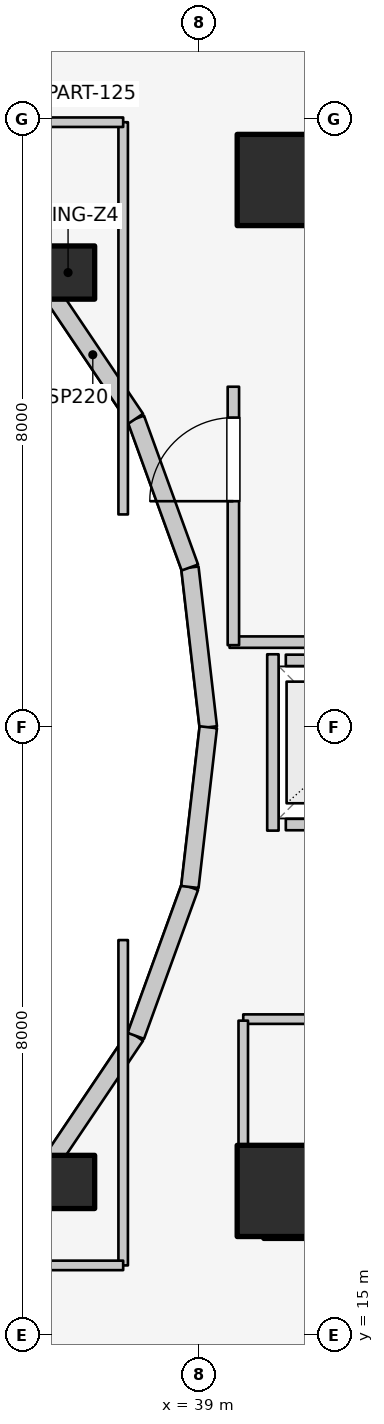
"""IFC4 building model, lengths in metres.
Left out: names, types, materials, properties, quantities, classifications, styles, units other than length and angle.
Written with IfcOpenShell. Run it as: python <this file> out.ifc"""

import sys

from ifc_helpers import new_model, si_unit, direction, frame, frame_2d, origin, origin_2d, place, context, subcontext, project, spatial, rectangle, extrude, element, fill, save


model = new_model("IFC4")
c1 = context("Model", 3, precision=1e-05, world=origin(), true_north=direction((0.0, 1.0)))
c2 = subcontext(c1, "Body", "Model", "MODEL_VIEW")
j1 = project(units=[si_unit("LENGTHUNIT", "METRE"), si_unit("PLANEANGLEUNIT", "RADIAN")], contexts=[c1])
p1 = place(None, origin())
s1 = spatial("IfcSite", under=j1, at=p1, CompositionType="ELEMENT")
p2 = place(p1, origin())
s2 = spatial("IfcBuilding", under=s1, at=p2, CompositionType="ELEMENT")
p3 = place(p2, frame((0.0, 0.0, 207.8)))
s3 = spatial("IfcBuildingStorey", under=s2, at=p3, CompositionType="ELEMENT", Elevation=207.8)
for number, where, z_axis, x_axis in (
    (1, (39.85, 16.55, 0.0), (0.0, 0.0, 1.0), (1.0, 0.0, 0.0)),
    (2, (39.85, 30.35, 0.0), (0.0, 0.0, 1.0), (1.0, 0.0, 0.0)),
):
    element("IfcWall", number, at=place(p3, frame(where, z_axis=z_axis, x_axis=x_axis)), inside=s3, PredefinedType="SHEAR", context=c2, shape_type="SweptSolid", body=[
        extrude(rectangle(XDim=4.5, YDim=0.55, at=frame_2d((2.25, 0.0))), origin(), (0.0, 0.0, 1.0), 3.1),
    ])
for number, where, z_axis, x_axis in (
    (3, (40.1, 16.9, 0.0), (0.0, 0.0, 1.0), (1.0, 0.0, 0.0)),
    (4, (40.1, 30.2, 0.0), (0.0, 0.0, 1.0), (1.0, 0.0, 0.0)),
):
    element("IfcColumn", number, at=place(p3, frame(where, z_axis=z_axis, x_axis=x_axis)), inside=s3, PredefinedType="COLUMN", context=c2, shape_type="SweptSolid", body=[
        extrude(rectangle(XDim=1.2, YDim=1.2, at=origin_2d()), origin(), (0.0, 0.0, 1.0), 3.1),
    ])
for number, where, z_axis, x_axis in (
    (5, (37.275, 28.982, 0.0), (0.0, 0.0, 1.0), (1.0, 0.0, 0.0)),
    (6, (37.275, 17.018, 0.0), (0.0, 0.0, 1.0), (1.0, 0.0, 0.0)),
):
    element("IfcColumn", number, at=place(p3, frame(where, z_axis=z_axis, x_axis=x_axis)), inside=s3, PredefinedType="COLUMN", context=c2, shape_type="SweptSolid", body=[
        extrude(rectangle(XDim=0.7, YDim=0.7, at=origin_2d()), origin(), (0.0, 0.0, 1.0), 3.1),
    ])
p4 = place(p3, frame((39.12, 23.0, 0.0), z_axis=(0.0, 0.0, 1.0), x_axis=(-0.114711713601, 0.993398823617, 0.0)))
e7 = element("IfcWall", 7, at=p4, inside=s3, PredefinedType="STANDARD", context=c2, shape_type="SweptSolid", body=[
    extrude(rectangle(XDim=2.115, YDim=0.23, at=frame_2d((1.058, 0.0))), origin(), (0.0, 0.0, 1.0), 2.56),
])
p5 = place(p3, frame((38.877, 25.102, 0.0), z_axis=(0.0, 0.0, 1.0), x_axis=(-0.341423187295, 0.93990968033, 0.0)))
e8 = element("IfcWall", 8, at=p5, inside=s3, PredefinedType="STANDARD", context=c2, shape_type="SweptSolid", body=[
    extrude(rectangle(XDim=2.084, YDim=0.23, at=frame_2d((1.042, 0.0))), origin(), (0.0, 0.0, 1.0), 2.56),
])
p6 = place(p3, frame((38.166, 27.06, 0.0), z_axis=(0.0, 0.0, 1.0), x_axis=(-0.558197800898, 0.829707909492, 0.0)))
e9 = element("IfcWall", 9, at=p6, inside=s3, PredefinedType="STANDARD", context=c2, shape_type="SweptSolid", body=[
    extrude(rectangle(XDim=2.027, YDim=0.23, at=frame_2d((1.013, 0.0))), origin(), (0.0, 0.0, 1.0), 1.22),
])
for number, where, z_axis, x_axis in (
    (10, (37.035, 28.742, 0.0), (0.0, 0.0, 1.0), (-0.753, 0.659, 0.0)),
    (11, (35.56, 15.968, 0.0), (0.0, 0.0, 1.0), (0.753, 0.659, 0.0)),
):
    element("IfcWall", number, at=place(p3, frame(where, z_axis=z_axis, x_axis=x_axis)), inside=s3, PredefinedType="STANDARD", context=c2, shape_type="SweptSolid", body=[
        extrude(rectangle(XDim=1.959, YDim=0.23, at=frame_2d((0.98, 0.0))), origin(), (0.0, 0.0, 1.0), 1.22),
    ])
p7 = place(p3, frame((37.035, 17.258, 0.0), z_axis=(0.0, 0.0, 1.0), x_axis=(0.558197800898, 0.829707909492, 0.0)))
e12 = element("IfcWall", 12, at=p7, inside=s3, PredefinedType="STANDARD", context=c2, shape_type="SweptSolid", body=[
    extrude(rectangle(XDim=2.027, YDim=0.23, at=frame_2d((1.013, 0.0))), origin(), (0.0, 0.0, 1.0), 1.22),
])
p8 = place(p3, frame((38.166, 18.94, 0.0), z_axis=(0.0, 0.0, 1.0), x_axis=(0.341423187295, 0.93990968033, 0.0)))
e13 = element("IfcWall", 13, at=p8, inside=s3, PredefinedType="STANDARD", context=c2, shape_type="SweptSolid", body=[
    extrude(rectangle(XDim=2.084, YDim=0.23, at=frame_2d((1.042, 0.0))), origin(), (0.0, 0.0, 1.0), 2.56),
])
p9 = place(p3, frame((38.877, 20.898, 0.0), z_axis=(0.0, 0.0, 1.0), x_axis=(0.114711713601, 0.993398823617, 0.0)))
e14 = element("IfcWall", 14, at=p9, inside=s3, PredefinedType="STANDARD", context=c2, shape_type="SweptSolid", body=[
    extrude(rectangle(XDim=2.115, YDim=0.23, at=frame_2d((1.058, 0.0))), origin(), (0.0, 0.0, 1.0), 2.56),
])
p10 = place(p3, frame((40.14, 21.72, 0.0), z_axis=(0.0, 0.0, 1.0), x_axis=(1.0, 0.0, 0.0)))
e15 = element("IfcWall", 15, at=p10, inside=s3, PredefinedType="SOLIDWALL", context=c2, shape_type="SweptSolid", body=[
    extrude(rectangle(XDim=1.82, YDim=0.15, at=frame_2d((0.91, 0.0))), origin(), (0.0, 0.0, 1.0), 2.12),
])
p11 = place(p10, frame((0.36, 0.0, 0.0)))
e16 = element("IfcOpeningElement", 16, at=p11, cuts=e15, PredefinedType="OPENING", context=c2, shape_type="SweptSolid", body=[
    extrude(rectangle(XDim=1.1, YDim=2.1, at=frame_2d((0.55, 1.05))), frame((0.0, 0.085, 0.0), z_axis=(0.0, -1.0, 0.0), x_axis=(1.0, 0.0, 0.0)), (0.0, 0.0, 1.0), 0.17),
])
p12 = place(p3, frame((40.14, 23.88, 0.0), z_axis=(0.0, 0.0, 1.0), x_axis=(1.0, 0.0, 0.0)))
e17 = element("IfcWall", 17, at=p12, inside=s3, PredefinedType="SOLIDWALL", context=c2, shape_type="SweptSolid", body=[
    extrude(rectangle(XDim=1.82, YDim=0.15, at=frame_2d((0.91, 0.0))), origin(), (0.0, 0.0, 1.0), 2.12),
])
p13 = place(p3, frame((39.97, 21.64, 0.0), z_axis=(0.0, 0.0, 1.0), x_axis=(0.0, 1.0, 0.0)))
e18 = element("IfcWall", 18, at=p13, inside=s3, PredefinedType="SOLIDWALL", context=c2, shape_type="SweptSolid", body=[
    extrude(rectangle(XDim=2.32, YDim=0.15, at=frame_2d((1.16, 0.0))), origin(), (0.0, 0.0, 1.0), 2.12),
])
p14 = place(p3, frame((39.4, 24.12, 0.0), z_axis=(0.0, 0.0, 1.0), x_axis=(1.0, 0.0, 0.0)))
e19 = element("IfcWall", 19, at=p14, inside=s3, PredefinedType="PARTITIONING", context=c2, shape_type="SweptSolid", body=[
    extrude(rectangle(XDim=5.08, YDim=0.15, at=frame_2d((2.54, 0.0))), origin(), (0.0, 0.0, 1.0), 2.12),
])
p15 = place(p3, frame((39.45, 24.08, 0.0), z_axis=(0.0, 0.0, 1.0), x_axis=(0.0, 1.0, 0.0)))
e20 = element("IfcWall", 20, at=p15, inside=s3, PredefinedType="PARTITIONING", context=c2, shape_type="SweptSolid", body=[
    extrude(rectangle(XDim=3.4, YDim=0.15, at=frame_2d((1.7, 0.0))), origin(), (0.0, 0.0, 1.0), 2.575),
])
p16 = place(p15, frame((1.894, 0.0, 0.0)))
e21 = element("IfcOpeningElement", 21, at=p16, cuts=e20, PredefinedType="OPENING", context=c2, shape_type="SweptSolid", body=[
    extrude(rectangle(XDim=1.1, YDim=2.1, at=frame_2d((0.55, 1.05))), frame((0.0, 0.085, 0.0), z_axis=(0.0, -1.0, 0.0), x_axis=(1.0, 0.0, 0.0)), (0.0, 0.0, 1.0), 0.17),
])
p17 = place(p3, frame((39.58, 19.16, 0.0), z_axis=(0.0, 0.0, 1.0), x_axis=(1.0, 0.0, 0.0)))
e22 = element("IfcWall", 22, at=p17, inside=s3, PredefinedType="PARTITIONING", context=c2, shape_type="SweptSolid", body=[
    extrude(rectangle(XDim=4.87, YDim=0.125, at=frame_2d((2.435, 0.0))), origin(), (0.0, 0.0, 1.0), 2.12),
])
p18 = place(p17, frame((1.748, 0.0, 0.0)))
e23 = element("IfcOpeningElement", 23, at=p18, cuts=e22, PredefinedType="OPENING", context=c2, shape_type="SweptSolid", body=[
    extrude(rectangle(XDim=0.85, YDim=2.05, at=frame_2d((0.425, 1.025))), frame((0.0, 0.073, 0.0), z_axis=(0.0, -1.0, 0.0), x_axis=(1.0, 0.0, 0.0)), (0.0, 0.0, 1.0), 0.145),
])
p19 = place(p3, frame((39.58, 17.1, 0.0), z_axis=(0.0, 0.0, 1.0), x_axis=(0.0, 1.0, 0.0)))
e24 = element("IfcWall", 24, at=p19, inside=s3, PredefinedType="PARTITIONING", context=c2, shape_type="SweptSolid", body=[
    extrude(rectangle(XDim=2.04, YDim=0.125, at=frame_2d((1.02, 0.0))), origin(), (0.0, 0.0, 1.0), 1.952),
])
p20 = place(p3, frame((35.55, 30.015, 0.0), z_axis=(0.0, 0.0, 1.0), x_axis=(0.523992004803, 0.851723182086, 0.0)))
e25 = element("IfcWall", 25, at=p20, inside=s3, PredefinedType="PARTITIONING", context=c2, shape_type="SweptSolid", body=[
    extrude(rectangle(XDim=3.101, YDim=0.125, at=frame_2d((1.551, 0.0))), origin(), (0.0, 0.0, 1.0), 2.096),
])
p21 = place(p3, frame((38.0, 25.8, 0.0), z_axis=(0.0, 0.0, 1.0), x_axis=(0.0, 1.0, 0.0)))
e26 = element("IfcWall", 26, at=p21, inside=s3, PredefinedType="PARTITIONING", context=c2, shape_type="SweptSolid", body=[
    extrude(rectangle(XDim=5.16, YDim=0.125, at=frame_2d((2.58, 0.0))), origin(), (0.0, 0.0, 1.0), 1.952),
])
p22 = place(p3, frame((35.4, 30.96, 0.0), z_axis=(0.0, 0.0, 1.0), x_axis=(1.0, 0.0, 0.0)))
e27 = element("IfcWall", 27, at=p22, inside=s3, PredefinedType="PARTITIONING", context=c2, shape_type="SweptSolid", body=[
    extrude(rectangle(XDim=2.6, YDim=0.125, at=frame_2d((1.3, 0.0))), origin(), (0.0, 0.0, 1.0), 2.096),
])
p23 = place(p3, frame((38.0, 15.92, 0.0), z_axis=(0.0, 0.0, 1.0), x_axis=(0.0, 1.0, 0.0)))
e28 = element("IfcWall", 28, at=p23, inside=s3, PredefinedType="PARTITIONING", context=c2, shape_type="SweptSolid", body=[
    extrude(rectangle(XDim=4.28, YDim=0.125, at=frame_2d((2.14, 0.0))), origin(), (0.0, 0.0, 1.0), 1.22),
])
p24 = place(p3, frame((35.4, 15.92, 0.0), z_axis=(0.0, 0.0, 1.0), x_axis=(1.0, 0.0, 0.0)))
e29 = element("IfcWall", 29, at=p24, inside=s3, PredefinedType="PARTITIONING", context=c2, shape_type="SweptSolid", body=[
    extrude(rectangle(XDim=2.6, YDim=0.125, at=frame_2d((1.3, 0.0))), origin(), (0.0, 0.0, 1.0), 1.22),
])
p25 = place(p16, origin())
e30 = element("IfcDoor", 30, at=p25, inside=s3, OperationType="SINGLE_SWING_LEFT", PredefinedType="DOOR", context=c2, shape_type="SweptSolid", body=[
    extrude(rectangle(XDim=1.1, YDim=2.1, at=frame_2d((0.55, 1.05))), frame((0.0, 0.025, 0.0), z_axis=(0.0, -1.0, 0.0), x_axis=(1.0, 0.0, 0.0)), (0.0, 0.0, 1.0), 0.05),
])
fill(e21, e30)
save(model, sys.argv[1])
